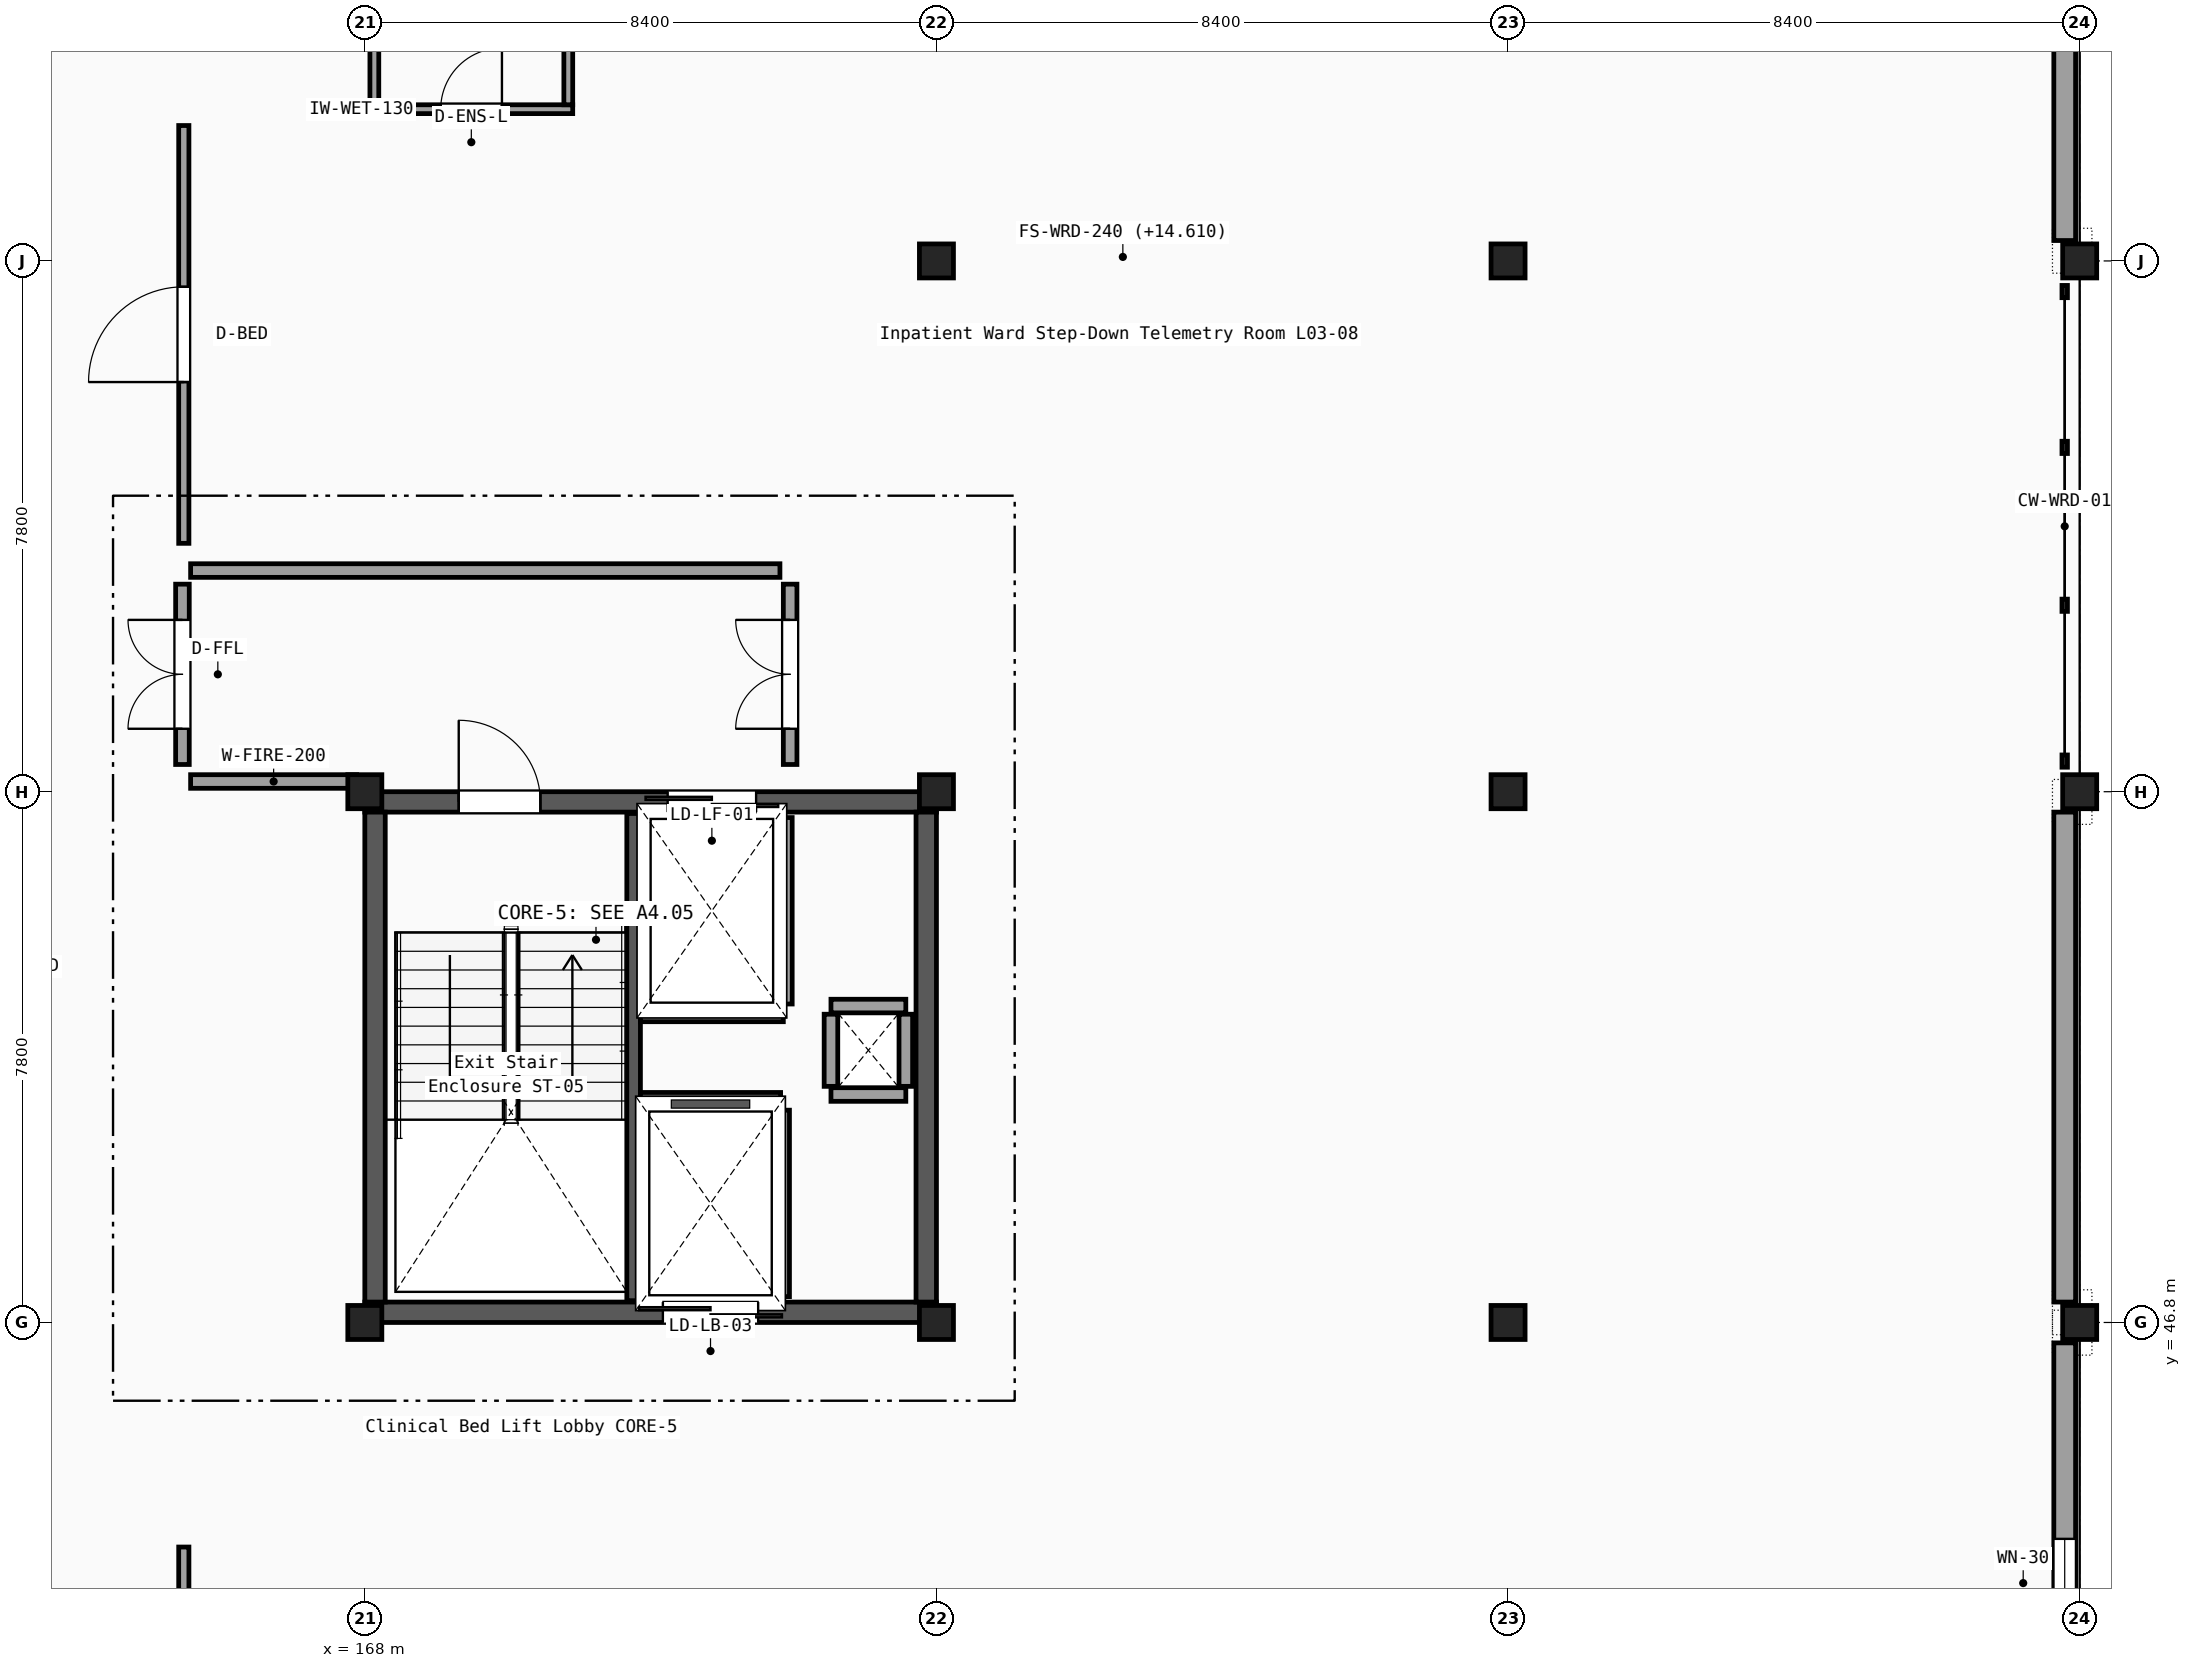
"""IFC4 building model, lengths in metres.
Left out: names, types, materials, properties, quantities, classifications, styles, units other than length and angle.
Written with IfcOpenShell. Run it as: python <this file> out.ifc"""

import sys

from ifc_helpers import new_model, si_unit, direction, frame, frame_2d, origin, origin_2d, place, context, subcontext, project, spatial, rectangle, i_section, extrude, element, fill, save


model = new_model("IFC4")
c1 = context("Model", 3, precision=1e-05, world=origin(), true_north=direction((0.0, 1.0)))
c2 = subcontext(c1, "Body", "Model", "MODEL_VIEW")
j1 = project(units=[si_unit("LENGTHUNIT", "METRE"), si_unit("PLANEANGLEUNIT", "RADIAN")], contexts=[c1])
p1 = place(None, origin())
s1 = spatial("IfcSite", under=j1, at=p1, CompositionType="ELEMENT")
p2 = place(p1, origin())
s2 = spatial("IfcBuilding", under=s1, at=p2, CompositionType="ELEMENT")
p3 = place(p2, frame((0.0, 0.0, 14.85)))
s3 = spatial("IfcBuildingStorey", under=s2, at=p3, CompositionType="ELEMENT", Elevation=14.85)
for number, where, z_axis, x_axis in (
    (1, (168.0, 46.8, 0.0), (0.0, 0.0, 1.0), (1.0, 0.0, 0.0)),
    (2, (168.0, 54.6, 0.0), (0.0, 0.0, 1.0), (1.0, 0.0, 0.0)),
    (3, (176.4, 46.8, 0.0), (0.0, 0.0, 1.0), (1.0, 0.0, 0.0)),
    (4, (176.4, 54.6, 0.0), (0.0, 0.0, 1.0), (1.0, 0.0, 0.0)),
    (5, (176.4, 62.4, 0.0), (0.0, 0.0, 1.0), (1.0, 0.0, 0.0)),
    (6, (184.8, 46.8, 0.0), (0.0, 0.0, 1.0), (1.0, 0.0, 0.0)),
    (7, (184.8, 54.6, 0.0), (0.0, 0.0, 1.0), (1.0, 0.0, 0.0)),
    (8, (184.8, 62.4, 0.0), (0.0, 0.0, 1.0), (1.0, 0.0, 0.0)),
    (9, (193.2, 46.8, 0.0), (0.0, 0.0, 1.0), (1.0, 0.0, 0.0)),
    (10, (193.2, 54.6, 0.0), (0.0, 0.0, 1.0), (1.0, 0.0, 0.0)),
    (11, (193.2, 62.4, 0.0), (0.0, 0.0, 1.0), (1.0, 0.0, 0.0)),
):
    element("IfcColumn", number, at=place(p3, frame(where, z_axis=z_axis, x_axis=x_axis)), inside=s3, PredefinedType="COLUMN", context=c2, shape_type="SweptSolid", body=[
        extrude(i_section(OverallWidth=0.3, OverallDepth=0.5, WebThickness=0.014, FlangeThickness=0.028, FilletRadius=0.027, at=origin_2d()), origin(), (0.0, 0.0, 1.0), 4.05),
    ])
p4 = place(p3, frame((192.98, 39.44, 0.0), z_axis=(0.0, 0.0, 1.0), x_axis=(0.0, 1.0, 0.0)))
e12 = element("IfcWall", 12, at=p4, inside=s3, PredefinedType="SOLIDWALL", context=c2, shape_type="SweptSolid", body=[
    extrude(rectangle(XDim=7.06, YDim=0.32, at=frame_2d((3.53, 0.0))), origin(), (0.0, 0.0, 1.0), 3.35),
])
p5 = place(p4, frame((2.88, 0.0, 0.9)))
e13 = element("IfcOpeningElement", 13, at=p5, cuts=e12, PredefinedType="OPENING", context=c2, shape_type="SweptSolid", body=[
    extrude(rectangle(XDim=1.3, YDim=1.6, at=frame_2d((0.65, 0.8))), frame((0.0, 0.17, 0.0), z_axis=(0.0, -1.0, 0.0), x_axis=(1.0, 0.0, 0.0)), (0.0, 0.0, 1.0), 0.34),
])
for number, where, z_axis, x_axis in (
    (14, (192.98, 47.1, 0.0), (0.0, 0.0, 1.0), (0.0, 1.0, 0.0)),
    (15, (192.98, 62.7, 0.0), (0.0, 0.0, 1.0), (0.0, 1.0, 0.0)),
):
    element("IfcWall", number, at=place(p3, frame(where, z_axis=z_axis, x_axis=x_axis)), inside=s3, PredefinedType="SOLIDWALL", context=c2, shape_type="SweptSolid", body=[
        extrude(rectangle(XDim=7.2, YDim=0.32, at=frame_2d((3.6, 0.0))), origin(), (0.0, 0.0, 1.0), 3.35),
    ])
p6 = place(p3, frame((168.0, 46.95, 0.0), z_axis=(0.0, 0.0, 1.0), x_axis=(1.0, 0.0, 0.0)))
e16 = element("IfcWall", 16, at=p6, inside=s3, PredefinedType="SHEAR", context=c2, shape_type="SweptSolid", body=[
    extrude(rectangle(XDim=8.4, YDim=0.3, at=frame_2d((4.2, 0.0))), origin(), (0.0, 0.0, 1.0), 3.81),
])
p7 = place(p6, frame((4.38, 0.0, 0.0)))
e17 = element("IfcOpeningElement", 17, at=p7, cuts=e16, PredefinedType="OPENING", context=c2, shape_type="SweptSolid", body=[
    extrude(rectangle(XDim=1.4, YDim=2.2, at=frame_2d((0.7, 1.1))), frame((0.0, 0.16, 0.0), z_axis=(0.0, -1.0, 0.0), x_axis=(1.0, 0.0, 0.0)), (0.0, 0.0, 1.0), 0.32),
])
p8 = place(p3, frame((168.0, 54.45, 0.0), z_axis=(0.0, 0.0, 1.0), x_axis=(1.0, 0.0, 0.0)))
e18 = element("IfcWall", 18, at=p8, inside=s3, PredefinedType="SHEAR", context=c2, shape_type="SweptSolid", body=[
    extrude(rectangle(XDim=8.4, YDim=0.3, at=frame_2d((4.2, 0.0))), origin(), (0.0, 0.0, 1.0), 3.81),
])
p9 = place(p8, frame((1.38, 0.0, 0.0)))
e19 = element("IfcOpeningElement", 19, at=p9, cuts=e18, PredefinedType="OPENING", context=c2, shape_type="SweptSolid", body=[
    extrude(rectangle(XDim=1.2, YDim=2.15, at=frame_2d((0.6, 1.075))), frame((0.0, 0.16, 0.0), z_axis=(0.0, -1.0, 0.0), x_axis=(1.0, 0.0, 0.0)), (0.0, 0.0, 1.0), 0.32),
])
p10 = place(p8, frame((4.45, 0.0, 0.0)))
e20 = element("IfcOpeningElement", 20, at=p10, cuts=e18, PredefinedType="OPENING", context=c2, shape_type="SweptSolid", body=[
    extrude(rectangle(XDim=1.3, YDim=2.2, at=frame_2d((0.65, 1.1))), frame((0.0, 0.16, 0.0), z_axis=(0.0, -1.0, 0.0), x_axis=(1.0, 0.0, 0.0)), (0.0, 0.0, 1.0), 0.32),
])
for number, where, z_axis, x_axis in (
    (21, (168.15, 47.1, 0.0), (0.0, 0.0, 1.0), (0.0, 1.0, 0.0)),
    (22, (176.25, 47.1, 0.0), (0.0, 0.0, 1.0), (0.0, 1.0, 0.0)),
):
    element("IfcWall", number, at=place(p3, frame(where, z_axis=z_axis, x_axis=x_axis)), inside=s3, PredefinedType="SHEAR", context=c2, shape_type="SweptSolid", body=[
        extrude(rectangle(XDim=7.2, YDim=0.3, at=frame_2d((3.6, 0.0))), origin(), (0.0, 0.0, 1.0), 3.81),
    ])
p11 = place(p3, frame((171.95, 47.12, 0.0), z_axis=(0.0, 0.0, 1.0), x_axis=(0.0, 1.0, 0.0)))
e23 = element("IfcWall", 23, at=p11, inside=s3, PredefinedType="SHEAR", context=c2, shape_type="SweptSolid", body=[
    extrude(rectangle(XDim=7.16, YDim=0.2, at=frame_2d((3.58, 0.0))), origin(), (0.0, 0.0, 1.0), 3.81),
])
for number, where, z_axis, x_axis in (
    (24, (174.85, 50.15, 0.0), (0.0, 0.0, 1.0), (1.0, 0.0, 0.0)),
    (25, (174.85, 51.45, 0.0), (0.0, 0.0, 1.0), (1.0, 0.0, 0.0)),
):
    element("IfcWall", number, at=place(p3, frame(where, z_axis=z_axis, x_axis=x_axis)), inside=s3, PredefinedType="PARTITIONING", context=c2, shape_type="SweptSolid", body=[
        extrude(rectangle(XDim=1.1, YDim=0.2, at=frame_2d((0.55, 0.0))), origin(), (0.0, 0.0, 1.0), 3.35),
    ])
for number, where, z_axis, x_axis in (
    (26, (174.85, 50.27, 0.0), (0.0, 0.0, 1.0), (0.0, 1.0, 0.0)),
    (27, (175.95, 50.27, 0.0), (0.0, 0.0, 1.0), (0.0, 1.0, 0.0)),
):
    element("IfcWall", number, at=place(p3, frame(where, z_axis=z_axis, x_axis=x_axis)), inside=s3, PredefinedType="PARTITIONING", context=c2, shape_type="SweptSolid", body=[
        extrude(rectangle(XDim=1.06, YDim=0.2, at=frame_2d((0.53, 0.0))), origin(), (0.0, 0.0, 1.0), 3.35),
    ])
p12 = place(p3, frame((174.18, 51.48, 0.0), z_axis=(0.0, 0.0, 1.0), x_axis=(0.0, 1.0, 0.0)))
e28 = element("IfcWall", 28, at=p12, inside=s3, PredefinedType="PARTITIONING", context=c2, shape_type="SweptSolid", body=[
    extrude(rectangle(XDim=2.74, YDim=0.2, at=frame_2d((1.37, 0.0))), origin(), (0.0, 0.0, 1.0), 3.35),
])
p13 = place(p3, frame((172.05, 51.32, 0.0), z_axis=(0.0, 0.0, 1.0), x_axis=(1.0, 0.0, 0.0)))
e29 = element("IfcWall", 29, at=p13, inside=s3, PredefinedType="PARTITIONING", context=c2, shape_type="SweptSolid", body=[
    extrude(rectangle(XDim=2.1, YDim=0.2, at=frame_2d((1.05, 0.0))), origin(), (0.0, 0.0, 1.0), 3.35),
])
p14 = place(p3, frame((174.14, 47.18, 0.0), z_axis=(0.0, 0.0, 1.0), x_axis=(0.0, 1.0, 0.0)))
e30 = element("IfcWall", 30, at=p14, inside=s3, PredefinedType="PARTITIONING", context=c2, shape_type="SweptSolid", body=[
    extrude(rectangle(XDim=2.74, YDim=0.2, at=frame_2d((1.37, 0.0))), origin(), (0.0, 0.0, 1.0), 3.35),
])
p15 = place(p3, frame((172.05, 50.08, 0.0), z_axis=(0.0, 0.0, 1.0), x_axis=(1.0, 0.0, 0.0)))
e31 = element("IfcWall", 31, at=p15, inside=s3, PredefinedType="PARTITIONING", context=c2, shape_type="SweptSolid", body=[
    extrude(rectangle(XDim=2.06, YDim=0.2, at=frame_2d((1.03, 0.0))), origin(), (0.0, 0.0, 1.0), 3.35),
])
p16 = place(p3, frame((165.44, 54.75, 0.0), z_axis=(0.0, 0.0, 1.0), x_axis=(1.0, 0.0, 0.0)))
e32 = element("IfcWall", 32, at=p16, inside=s3, PredefinedType="PARTITIONING", context=c2, shape_type="SweptSolid", body=[
    extrude(rectangle(XDim=2.44, YDim=0.2, at=frame_2d((1.22, 0.0))), origin(), (0.0, 0.0, 1.0), 3.35),
])
p17 = place(p3, frame((165.44, 57.85, 0.0), z_axis=(0.0, 0.0, 1.0), x_axis=(1.0, 0.0, 0.0)))
e33 = element("IfcWall", 33, at=p17, inside=s3, PredefinedType="PARTITIONING", context=c2, shape_type="SweptSolid", body=[
    extrude(rectangle(XDim=8.66, YDim=0.2, at=frame_2d((4.33, 0.0))), origin(), (0.0, 0.0, 1.0), 3.35),
])
p18 = place(p3, frame((165.32, 55.0, 0.0), z_axis=(0.0, 0.0, 1.0), x_axis=(0.0, 1.0, 0.0)))
e34 = element("IfcWall", 34, at=p18, inside=s3, PredefinedType="PARTITIONING", context=c2, shape_type="SweptSolid", body=[
    extrude(rectangle(XDim=2.65, YDim=0.2, at=frame_2d((1.325, 0.0))), origin(), (0.0, 0.0, 1.0), 3.35),
])
p19 = place(p18, frame((0.525, 0.0, 0.0)))
e35 = element("IfcOpeningElement", 35, at=p19, cuts=e34, PredefinedType="OPENING", context=c2, shape_type="SweptSolid", body=[
    extrude(rectangle(XDim=1.6, YDim=2.2, at=frame_2d((0.8, 1.1))), frame((0.0, 0.11, 0.0), z_axis=(0.0, -1.0, 0.0), x_axis=(1.0, 0.0, 0.0)), (0.0, 0.0, 1.0), 0.22),
])
p20 = place(p3, frame((174.25, 55.0, 0.0), z_axis=(0.0, 0.0, 1.0), x_axis=(0.0, 1.0, 0.0)))
e36 = element("IfcWall", 36, at=p20, inside=s3, PredefinedType="PARTITIONING", context=c2, shape_type="SweptSolid", body=[
    extrude(rectangle(XDim=2.65, YDim=0.2, at=frame_2d((1.325, 0.0))), origin(), (0.0, 0.0, 1.0), 3.35),
])
p21 = place(p20, frame((0.525, 0.0, 0.0)))
e37 = element("IfcOpeningElement", 37, at=p21, cuts=e36, PredefinedType="OPENING", context=c2, shape_type="SweptSolid", body=[
    extrude(rectangle(XDim=1.6, YDim=2.2, at=frame_2d((0.8, 1.1))), frame((0.0, 0.11, 0.0), z_axis=(0.0, -1.0, 0.0), x_axis=(1.0, 0.0, 0.0)), (0.0, 0.0, 1.0), 0.22),
])
p22 = place(p3, frame((165.34, 39.62, 0.0), z_axis=(0.0, 0.0, 1.0), x_axis=(0.0, 1.0, 0.0)))
e38 = element("IfcWall", 38, at=p22, inside=s3, PredefinedType="PARTITIONING", context=c2, shape_type="SweptSolid", body=[
    extrude(rectangle(XDim=3.88, YDim=0.15, at=frame_2d((1.94, 0.0))), origin(), (0.0, 0.0, 1.0), 3.77),
])
p23 = place(p22, frame((1.24, 0.0, 0.0)))
e39 = element("IfcOpeningElement", 39, at=p23, cuts=e38, PredefinedType="OPENING", context=c2, shape_type="SweptSolid", body=[
    extrude(rectangle(XDim=1.4, YDim=2.2, at=frame_2d((0.7, 1.1))), frame((0.0, 0.085, 0.0), z_axis=(0.0, -1.0, 0.0), x_axis=(1.0, 0.0, 0.0)), (0.0, 0.0, 1.0), 0.17),
])
p24 = place(p3, frame((165.34, 58.25, 0.0), z_axis=(0.0, 0.0, 1.0), x_axis=(0.0, 1.0, 0.0)))
e40 = element("IfcWall", 40, at=p24, inside=s3, PredefinedType="PARTITIONING", context=c2, shape_type="SweptSolid", body=[
    extrude(rectangle(XDim=6.14, YDim=0.15, at=frame_2d((3.07, 0.0))), origin(), (0.0, 0.0, 1.0), 3.35),
])
p25 = place(p24, frame((2.37, 0.0, 0.0)))
e41 = element("IfcOpeningElement", 41, at=p25, cuts=e40, PredefinedType="OPENING", context=c2, shape_type="SweptSolid", body=[
    extrude(rectangle(XDim=1.4, YDim=2.2, at=frame_2d((0.7, 1.1))), frame((0.0, 0.085, 0.0), z_axis=(0.0, -1.0, 0.0), x_axis=(1.0, 0.0, 0.0)), (0.0, 0.0, 1.0), 0.17),
])
p26 = place(p3, frame((168.075, 64.63, 0.0), z_axis=(0.0, 0.0, 1.0), x_axis=(1.0, 0.0, 0.0)))
e42 = element("IfcWall", 42, at=p26, inside=s3, PredefinedType="PARTITIONING", context=c2, shape_type="SweptSolid", body=[
    extrude(rectangle(XDim=2.98, YDim=0.13, at=frame_2d((1.49, 0.0))), origin(), (0.0, 0.0, 1.0), 3.48),
])
p27 = place(p26, frame((1.04, 0.0, 0.0)))
e43 = element("IfcOpeningElement", 43, at=p27, cuts=e42, PredefinedType="OPENING", context=c2, shape_type="SweptSolid", body=[
    extrude(rectangle(XDim=0.9, YDim=2.1, at=frame_2d((0.45, 1.05))), frame((0.0, 0.075, 0.0), z_axis=(0.0, -1.0, 0.0), x_axis=(1.0, 0.0, 0.0)), (0.0, 0.0, 1.0), 0.15),
])
p28 = place(p3, frame((168.14, 64.695, 0.0), z_axis=(0.0, 0.0, 1.0), x_axis=(0.0, 1.0, 0.0)))
e44 = element("IfcWall", 44, at=p28, inside=s3, PredefinedType="PARTITIONING", context=c2, shape_type="SweptSolid", body=[
    extrude(rectangle(XDim=2.22, YDim=0.13, at=frame_2d((1.11, 0.0))), origin(), (0.0, 0.0, 1.0), 3.48),
])
p29 = place(p3, frame((170.99, 64.695, 0.0), z_axis=(0.0, 0.0, 1.0), x_axis=(0.0, 1.0, 0.0)))
e45 = element("IfcWall", 45, at=p29, inside=s3, PredefinedType="PARTITIONING", context=c2, shape_type="SweptSolid", body=[
    extrude(rectangle(XDim=2.22, YDim=0.13, at=frame_2d((1.11, 0.0))), origin(), (0.0, 0.0, 1.0), 3.77),
])
p30 = place(p5, origin())
e46 = element("IfcWindow", 46, at=p30, inside=s3, PartitioningType="SINGLE_PANEL", PredefinedType="WINDOW", context=c2, shape_type="SweptSolid", body=[
    extrude(rectangle(XDim=1.3, YDim=1.6, at=frame_2d((0.65, 0.8))), frame((0.0, 0.03, 0.0), z_axis=(0.0, -1.0, 0.0), x_axis=(1.0, 0.0, 0.0)), (0.0, 0.0, 1.0), 0.06),
])
fill(e13, e46)
p31 = place(p9, origin())
e47 = element("IfcDoor", 47, at=p31, inside=s3, OperationType="SINGLE_SWING_LEFT", PredefinedType="DOOR", context=c2, shape_type="SweptSolid", body=[
    extrude(rectangle(XDim=1.2, YDim=2.15, at=frame_2d((0.6, 1.075))), frame((0.0, 0.025, 0.0), z_axis=(0.0, -1.0, 0.0), x_axis=(1.0, 0.0, 0.0)), (0.0, 0.0, 1.0), 0.05),
])
fill(e19, e47)
p32 = place(p10, origin())
e48 = element("IfcDoor", 48, at=p32, inside=s3, OperationType="DOUBLE_DOOR_SLIDING", PredefinedType="DOOR", context=c2, shape_type="SweptSolid", body=[
    extrude(rectangle(XDim=1.3, YDim=2.2, at=frame_2d((0.65, 1.1))), frame((0.0, 0.025, 0.0), z_axis=(0.0, -1.0, 0.0), x_axis=(1.0, 0.0, 0.0)), (0.0, 0.0, 1.0), 0.05),
])
fill(e20, e48)
p33 = place(p7, origin())
e49 = element("IfcDoor", 49, at=p33, inside=s3, OperationType="DOUBLE_DOOR_SLIDING", PredefinedType="DOOR", context=c2, shape_type="SweptSolid", body=[
    extrude(rectangle(XDim=1.4, YDim=2.2, at=frame_2d((0.7, 1.1))), frame((0.0, 0.025, 0.0), z_axis=(0.0, -1.0, 0.0), x_axis=(1.0, 0.0, 0.0)), (0.0, 0.0, 1.0), 0.05),
])
fill(e17, e49)
p34 = place(p19, origin())
e50 = element("IfcDoor", 50, at=p34, inside=s3, OperationType="DOUBLE_DOOR_SINGLE_SWING", PredefinedType="DOOR", context=c2, shape_type="SweptSolid", body=[
    extrude(rectangle(XDim=1.6, YDim=2.2, at=frame_2d((0.8, 1.1))), frame((0.0, 0.025, 0.0), z_axis=(0.0, -1.0, 0.0), x_axis=(1.0, 0.0, 0.0)), (0.0, 0.0, 1.0), 0.05),
])
fill(e35, e50)
p35 = place(p21, origin())
e51 = element("IfcDoor", 51, at=p35, inside=s3, OperationType="DOUBLE_DOOR_SINGLE_SWING", PredefinedType="DOOR", context=c2, shape_type="SweptSolid", body=[
    extrude(rectangle(XDim=1.6, YDim=2.2, at=frame_2d((0.8, 1.1))), frame((0.0, 0.025, 0.0), z_axis=(0.0, -1.0, 0.0), x_axis=(1.0, 0.0, 0.0)), (0.0, 0.0, 1.0), 0.05),
])
fill(e37, e51)
p36 = place(p25, origin())
e52 = element("IfcDoor", 52, at=p36, inside=s3, OperationType="SINGLE_SWING_LEFT", PredefinedType="DOOR", context=c2, shape_type="SweptSolid", body=[
    extrude(rectangle(XDim=1.4, YDim=2.2, at=frame_2d((0.7, 1.1))), frame((0.0, 0.025, 0.0), z_axis=(0.0, -1.0, 0.0), x_axis=(1.0, 0.0, 0.0)), (0.0, 0.0, 1.0), 0.05),
])
fill(e41, e52)
p37 = place(p27, origin())
e53 = element("IfcDoor", 53, at=p37, inside=s3, OperationType="SINGLE_SWING_RIGHT", PredefinedType="DOOR", context=c2, shape_type="SweptSolid", body=[
    extrude(rectangle(XDim=0.9, YDim=2.1, at=frame_2d((0.45, 1.05))), frame((0.0, 0.025, 0.0), z_axis=(0.0, -1.0, 0.0), x_axis=(1.0, 0.0, 0.0)), (0.0, 0.0, 1.0), 0.05),
])
fill(e43, e53)
save(model, sys.argv[1])
